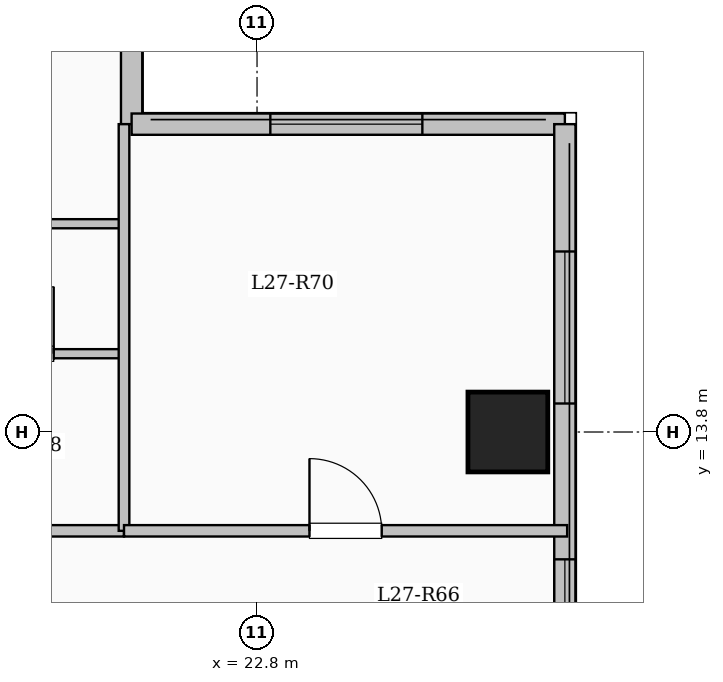
"""IFC4 building model, lengths in metres.
Left out: names, types, materials, properties, quantities, classifications, styles, units other than length and angle.
Written with IfcOpenShell. Run it as: python <this file> out.ifc"""

import sys

from ifc_helpers import new_model, si_unit, direction, frame, frame_2d, origin, origin_2d, place, context, subcontext, project, spatial, rectangle, extrude, element, fill, save


model = new_model("IFC4")
c1 = context("Model", 3, precision=1e-05, world=origin(), true_north=direction((0.0, 1.0)))
c2 = subcontext(c1, "Body", "Model", "MODEL_VIEW")
j1 = project(units=[si_unit("LENGTHUNIT", "METRE"), si_unit("PLANEANGLEUNIT", "RADIAN")], contexts=[c1])
p1 = place(None, origin())
s1 = spatial("IfcSite", under=j1, at=p1, CompositionType="ELEMENT")
p2 = place(p1, origin())
s2 = spatial("IfcBuilding", under=s1, at=p2, CompositionType="ELEMENT")
p3 = place(p2, frame((0.0, 0.0, 101.75)))
s3 = spatial("IfcBuildingStorey", under=s2, at=p3, CompositionType="ELEMENT", Elevation=101.75)
p4 = place(p3, frame((26.1, 13.8, 0.0), z_axis=(0.0, 0.0, 1.0), x_axis=(1.0, 0.0, 0.0)))
e1 = element("IfcColumn", 1, at=p4, inside=s3, PredefinedType="COLUMN", context=c2, shape_type="SweptSolid", body=[
    extrude(rectangle(XDim=1.05, YDim=1.05, at=origin_2d()), origin(), (0.0, 0.0, 1.0), 3.35),
])
p5 = place(p3, frame((21.15, 22.05, 0.0), z_axis=(0.0, 0.0, 1.0), x_axis=(0.0, -1.0, 0.0)))
e2 = element("IfcWall", 2, at=p5, inside=s3, PredefinedType="SOLIDWALL", context=c2, shape_type="SweptSolid", body=[
    extrude(rectangle(XDim=4.2, YDim=0.28, at=frame_2d((2.1, 0.0))), origin(), (0.0, 0.0, 1.0), 3.1),
])
p6 = place(p5, frame((1.218, 0.0, 0.9)))
e3 = element("IfcOpeningElement", 3, at=p6, cuts=e2, PredefinedType="OPENING", context=c2, shape_type="SweptSolid", body=[
    extrude(rectangle(XDim=1.8, YDim=1.65, at=frame_2d((0.9, 0.825))), frame((0.0, 0.15, 0.0), z_axis=(0.0, -1.0, 0.0), x_axis=(1.0, 0.0, 0.0)), (0.0, 0.0, 1.0), 0.3),
])
p7 = place(p3, frame((21.15, 17.85, 0.0), z_axis=(0.0, 0.0, 1.0), x_axis=(1.0, 0.0, 0.0)))
e4 = element("IfcWall", 4, at=p7, inside=s3, PredefinedType="SOLIDWALL", context=c2, shape_type="SweptSolid", body=[
    extrude(rectangle(XDim=5.7, YDim=0.28, at=frame_2d((2.85, 0.0))), origin(), (0.0, 0.0, 1.0), 3.1),
])
p8 = place(p7, frame((1.825, 0.0, 0.9)))
e5 = element("IfcOpeningElement", 5, at=p8, cuts=e4, PredefinedType="OPENING", context=c2, shape_type="SweptSolid", body=[
    extrude(rectangle(XDim=2.0, YDim=1.7, at=frame_2d((1.0, 0.85))), frame((0.0, 0.15, 0.0), z_axis=(0.0, -1.0, 0.0), x_axis=(1.0, 0.0, 0.0)), (0.0, 0.0, 1.0), 0.3),
])
p9 = place(p3, frame((26.85, 17.85, 0.0), z_axis=(0.0, 0.0, 1.0), x_axis=(0.0, -1.0, 0.0)))
e6 = element("IfcWall", 6, at=p9, inside=s3, PredefinedType="SOLIDWALL", context=c2, shape_type="SweptSolid", body=[
    extrude(rectangle(XDim=35.7, YDim=0.28, at=frame_2d((17.85, 0.0))), origin(), (0.0, 0.0, 1.0), 3.1),
])
p10 = place(p9, frame((1.675, 0.0, 0.9)))
e7 = element("IfcOpeningElement", 7, at=p10, cuts=e6, PredefinedType="OPENING", context=c2, shape_type="SweptSolid", body=[
    extrude(rectangle(XDim=2.0, YDim=1.7, at=frame_2d((1.0, 0.85))), frame((0.0, 0.15, 0.0), z_axis=(0.0, -1.0, 0.0), x_axis=(1.0, 0.0, 0.0)), (0.0, 0.0, 1.0), 0.3),
])
p11 = place(p9, frame((5.725, 0.0, 0.95)))
e8 = element("IfcOpeningElement", 8, at=p11, cuts=e6, PredefinedType="OPENING", context=c2, shape_type="SweptSolid", body=[
    extrude(rectangle(XDim=1.0, YDim=1.5, at=frame_2d((0.5, 0.75))), frame((0.0, 0.15, 0.0), z_axis=(0.0, -1.0, 0.0), x_axis=(1.0, 0.0, 0.0)), (0.0, 0.0, 1.0), 0.3),
])
p12 = place(p9, frame((15.1, 0.0, 0.9)))
e9 = element("IfcOpeningElement", 9, at=p12, cuts=e6, PredefinedType="OPENING", context=c2, shape_type="SweptSolid", body=[
    extrude(rectangle(XDim=2.0, YDim=1.7, at=frame_2d((1.0, 0.85))), frame((0.0, 0.15, 0.0), z_axis=(0.0, -1.0, 0.0), x_axis=(1.0, 0.0, 0.0)), (0.0, 0.0, 1.0), 0.3),
])
p13 = place(p9, frame((25.857, 0.0, 0.9)))
e10 = element("IfcOpeningElement", 10, at=p13, cuts=e6, PredefinedType="OPENING", context=c2, shape_type="SweptSolid", body=[
    extrude(rectangle(XDim=1.5, YDim=1.65, at=frame_2d((0.75, 0.825))), frame((0.0, 0.15, 0.0), z_axis=(0.0, -1.0, 0.0), x_axis=(1.0, 0.0, 0.0)), (0.0, 0.0, 1.0), 0.3),
])
p14 = place(p9, frame((30.75, 0.0, 0.9)))
e11 = element("IfcOpeningElement", 11, at=p14, cuts=e6, PredefinedType="OPENING", context=c2, shape_type="SweptSolid", body=[
    extrude(rectangle(XDim=2.4, YDim=1.8, at=frame_2d((1.2, 0.9))), frame((0.0, 0.15, 0.0), z_axis=(0.0, -1.0, 0.0), x_axis=(1.0, 0.0, 0.0)), (0.0, 0.0, 1.0), 0.3),
])
p15 = place(p3, frame((3.85, 12.5, 0.0), z_axis=(0.0, 0.0, 1.0), x_axis=(1.0, 0.0, 0.0)))
e12 = element("IfcWall", 12, at=p15, inside=s3, PredefinedType="PARTITIONING", context=c2, shape_type="SweptSolid", body=[
    extrude(rectangle(XDim=17.2, YDim=0.15, at=frame_2d((8.6, 0.0))), origin(), (0.0, 0.0, 1.0), 3.1),
])
p16 = place(p15, frame((1.6, 0.0, 0.0)))
e13 = element("IfcOpeningElement", 13, at=p16, cuts=e12, PredefinedType="OPENING", context=c2, shape_type="SweptSolid", body=[
    extrude(rectangle(XDim=0.96, YDim=2.15, at=frame_2d((0.48, 1.075))), frame((0.0, 0.085, 0.0), z_axis=(0.0, -1.0, 0.0), x_axis=(1.0, 0.0, 0.0)), (0.0, 0.0, 1.0), 0.17),
])
p17 = place(p15, frame((6.42, 0.0, 0.0)))
e14 = element("IfcOpeningElement", 14, at=p17, cuts=e12, PredefinedType="OPENING", context=c2, shape_type="SweptSolid", body=[
    extrude(rectangle(XDim=0.96, YDim=2.15, at=frame_2d((0.48, 1.075))), frame((0.0, 0.085, 0.0), z_axis=(0.0, -1.0, 0.0), x_axis=(1.0, 0.0, 0.0)), (0.0, 0.0, 1.0), 0.17),
])
p18 = place(p3, frame((18.32, 14.83, 0.0), z_axis=(0.0, 0.0, 1.0), x_axis=(1.0, 0.0, 0.0)))
e15 = element("IfcWall", 15, at=p18, inside=s3, PredefinedType="PARTITIONING", context=c2, shape_type="SweptSolid", body=[
    extrude(rectangle(XDim=2.73, YDim=0.12, at=frame_2d((1.365, 0.0))), origin(), (0.0, 0.0, 1.0), 3.1),
])
p19 = place(p18, frame((0.925, 0.0, 0.0)))
e16 = element("IfcOpeningElement", 16, at=p19, cuts=e15, PredefinedType="OPENING", context=c2, shape_type="SweptSolid", body=[
    extrude(rectangle(XDim=0.88, YDim=2.1, at=frame_2d((0.44, 1.05))), frame((0.0, 0.07, 0.0), z_axis=(0.0, -1.0, 0.0), x_axis=(1.0, 0.0, 0.0)), (0.0, 0.0, 1.0), 0.14),
])
p20 = place(p3, frame((15.25, 16.54, 0.0), z_axis=(0.0, 0.0, 1.0), x_axis=(1.0, 0.0, 0.0)))
e17 = element("IfcWall", 17, at=p20, inside=s3, PredefinedType="PARTITIONING", context=c2, shape_type="SweptSolid", body=[
    extrude(rectangle(XDim=5.86, YDim=0.12, at=frame_2d((2.93, 0.0))), origin(), (0.0, 0.0, 1.0), 3.1),
])
p21 = place(p20, frame((2.4, 0.0, 0.0)))
e18 = element("IfcOpeningElement", 18, at=p21, cuts=e17, PredefinedType="OPENING", context=c2, shape_type="SweptSolid", body=[
    extrude(rectangle(XDim=0.88, YDim=2.1, at=frame_2d((0.44, 1.05))), frame((0.0, 0.07, 0.0), z_axis=(0.0, -1.0, 0.0), x_axis=(1.0, 0.0, 0.0)), (0.0, 0.0, 1.0), 0.14),
])
p22 = place(p3, frame((21.05, 12.5, 0.0), z_axis=(0.0, 0.0, 1.0), x_axis=(0.0, 1.0, 0.0)))
e19 = element("IfcWall", 19, at=p22, inside=s3, PredefinedType="PARTITIONING", context=c2, shape_type="SweptSolid", body=[
    extrude(rectangle(XDim=5.35, YDim=0.14, at=frame_2d((2.675, 0.0))), origin(), (0.0, 0.0, 1.0), 3.1),
])
p23 = place(p3, frame((21.05, 12.5, 0.0), z_axis=(0.0, 0.0, 1.0), x_axis=(1.0, 0.0, 0.0)))
e20 = element("IfcWall", 20, at=p23, inside=s3, PredefinedType="PARTITIONING", context=c2, shape_type="SweptSolid", body=[
    extrude(rectangle(XDim=5.83, YDim=0.15, at=frame_2d((2.915, 0.0))), origin(), (0.0, 0.0, 1.0), 3.1),
])
p24 = place(p23, frame((2.44, 0.0, 0.0)))
e21 = element("IfcOpeningElement", 21, at=p24, cuts=e20, PredefinedType="OPENING", context=c2, shape_type="SweptSolid", body=[
    extrude(rectangle(XDim=0.95, YDim=2.15, at=frame_2d((0.475, 1.075))), frame((0.0, 0.085, 0.0), z_axis=(0.0, -1.0, 0.0), x_axis=(1.0, 0.0, 0.0)), (0.0, 0.0, 1.0), 0.17),
])
p25 = place(p8, origin())
e22 = element("IfcWindow", 22, at=p25, inside=s3, PartitioningType="SINGLE_PANEL", PredefinedType="WINDOW", context=c2, shape_type="SweptSolid", body=[
    extrude(rectangle(XDim=2.0, YDim=1.7, at=frame_2d((1.0, 0.85))), frame((0.0, 0.03, 0.0), z_axis=(0.0, -1.0, 0.0), x_axis=(1.0, 0.0, 0.0)), (0.0, 0.0, 1.0), 0.06),
])
fill(e5, e22)
p26 = place(p10, origin())
e23 = element("IfcWindow", 23, at=p26, inside=s3, PartitioningType="SINGLE_PANEL", PredefinedType="WINDOW", context=c2, shape_type="SweptSolid", body=[
    extrude(rectangle(XDim=2.0, YDim=1.7, at=frame_2d((1.0, 0.85))), frame((0.0, 0.03, 0.0), z_axis=(0.0, -1.0, 0.0), x_axis=(1.0, 0.0, 0.0)), (0.0, 0.0, 1.0), 0.06),
])
fill(e7, e23)
p27 = place(p11, origin())
e24 = element("IfcWindow", 24, at=p27, inside=s3, PartitioningType="SINGLE_PANEL", PredefinedType="WINDOW", context=c2, shape_type="SweptSolid", body=[
    extrude(rectangle(XDim=1.0, YDim=1.5, at=frame_2d((0.5, 0.75))), frame((0.0, 0.03, 0.0), z_axis=(0.0, -1.0, 0.0), x_axis=(1.0, 0.0, 0.0)), (0.0, 0.0, 1.0), 0.06),
])
fill(e8, e24)
p28 = place(p19, origin())
e25 = element("IfcDoor", 25, at=p28, inside=s3, OperationType="SINGLE_SWING_RIGHT", PredefinedType="DOOR", context=c2, shape_type="SweptSolid", body=[
    extrude(rectangle(XDim=0.88, YDim=2.1, at=frame_2d((0.44, 1.05))), frame((0.0, 0.025, 0.0), z_axis=(0.0, -1.0, 0.0), x_axis=(1.0, 0.0, 0.0)), (0.0, 0.0, 1.0), 0.05),
])
fill(e16, e25)
p29 = place(p24, origin())
e26 = element("IfcDoor", 26, at=p29, inside=s3, OperationType="SINGLE_SWING_LEFT", PredefinedType="DOOR", context=c2, shape_type="SweptSolid", body=[
    extrude(rectangle(XDim=0.95, YDim=2.15, at=frame_2d((0.475, 1.075))), frame((0.0, 0.025, 0.0), z_axis=(0.0, -1.0, 0.0), x_axis=(1.0, 0.0, 0.0)), (0.0, 0.0, 1.0), 0.05),
])
fill(e21, e26)
save(model, sys.argv[1])
